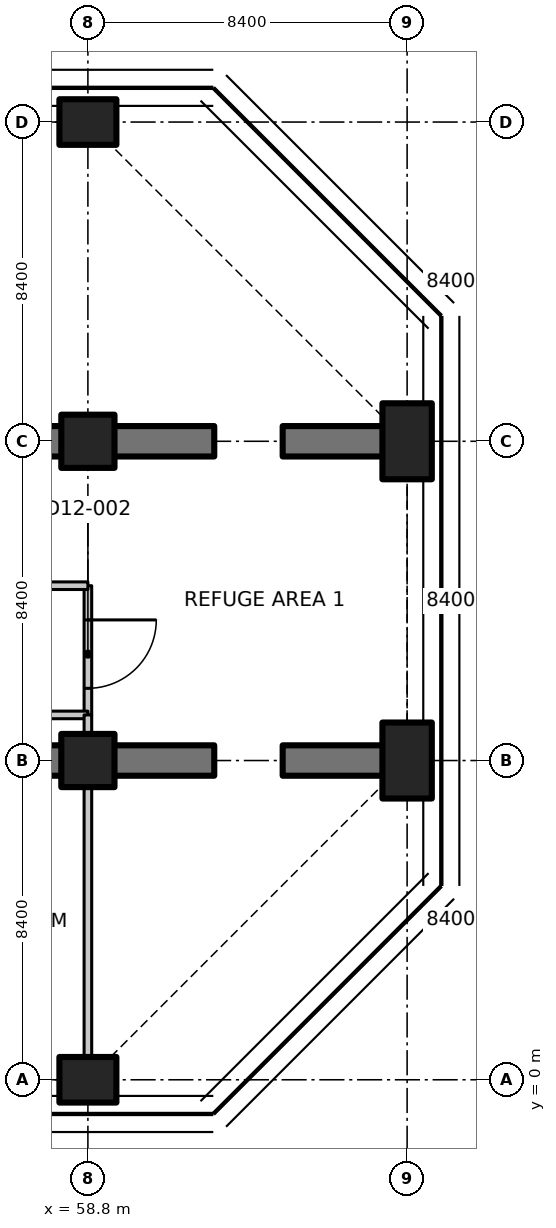
"""IFC4 building model, lengths in metres.
Left out: names, types, materials, properties, quantities, classifications, styles, units other than length and angle.
Written with IfcOpenShell. Run it as: python <this file> out.ifc"""

import sys

from ifc_helpers import new_model, si_unit, direction, frame, frame_2d, origin, origin_2d, place, context, subcontext, project, spatial, polyline, rectangle, outline, extrude, element, fill, save


model = new_model("IFC4")
c1 = context("Model", 3, precision=1e-05, world=origin(), true_north=direction((0.0, 1.0)))
c2 = subcontext(c1, "Body", "Model", "MODEL_VIEW")
j1 = project(units=[si_unit("LENGTHUNIT", "METRE"), si_unit("PLANEANGLEUNIT", "RADIAN")], contexts=[c1])
p1 = place(None, origin())
s1 = spatial("IfcSite", under=j1, at=p1, CompositionType="ELEMENT")
p2 = place(p1, origin())
s2 = spatial("IfcBuilding", under=s1, at=p2, CompositionType="ELEMENT")
p3 = place(p2, frame((0.0, 0.0, 86.9)))
s3 = spatial("IfcBuildingStorey", under=s2, at=p3, CompositionType="ELEMENT", Elevation=86.9)
p4 = place(p3, frame((58.8, 0.0, 0.0), z_axis=(0.0, 0.0, 1.0), x_axis=(0.0, 1.0, 0.0)))
e1 = element("IfcColumn", 1, at=p4, inside=s3, PredefinedType="COLUMN", context=c2, shape_type="SweptSolid", body=[
    extrude(rectangle(XDim=1.2, YDim=1.5, at=origin_2d()), origin(), (0.0, 0.0, 1.0), 4.55),
])
for number, where, z_axis, x_axis in (
    (2, (58.8, 8.4, 0.0), (0.0, 0.0, 1.0), (1.0, 0.0, 0.0)),
    (3, (58.8, 16.8, 0.0), (0.0, 0.0, 1.0), (1.0, 0.0, 0.0)),
):
    element("IfcColumn", number, at=place(p3, frame(where, z_axis=z_axis, x_axis=x_axis)), inside=s3, PredefinedType="COLUMN", context=c2, shape_type="SweptSolid", body=[
        extrude(rectangle(XDim=1.4, YDim=1.4, at=origin_2d()), origin(), (0.0, 0.0, 1.0), 4.55),
    ])
p5 = place(p3, frame((58.8, 25.2, 0.0), z_axis=(0.0, 0.0, 1.0), x_axis=(0.0, 1.0, 0.0)))
e4 = element("IfcColumn", 4, at=p5, inside=s3, PredefinedType="COLUMN", context=c2, shape_type="SweptSolid", body=[
    extrude(rectangle(XDim=1.2, YDim=1.5, at=origin_2d()), origin(), (0.0, 0.0, 1.0), 4.55),
])
for number, where, z_axis, x_axis in (
    (5, (67.2, 8.4, 0.0), (0.0, 0.0, 1.0), (1.0, 0.0, 0.0)),
    (6, (67.2, 16.8, 0.0), (0.0, 0.0, 1.0), (1.0, 0.0, 0.0)),
):
    element("IfcColumn", number, at=place(p3, frame(where, z_axis=z_axis, x_axis=x_axis)), inside=s3, PredefinedType="COLUMN", context=c2, shape_type="SweptSolid", body=[
        extrude(rectangle(XDim=1.3, YDim=2.0, at=origin_2d()), origin(), (0.0, 0.0, 1.0), 4.55),
    ])
p6 = place(p3, frame((55.5, 8.4, 0.0), z_axis=(0.0, 0.0, 1.0), x_axis=(1.0, 0.0, 0.0)))
e7 = element("IfcWall", 7, at=p6, inside=s3, PredefinedType="SHEAR", context=c2, shape_type="SweptSolid", body=[
    extrude(rectangle(XDim=2.63, YDim=0.8, at=frame_2d((1.315, 0.0))), origin(), (0.0, 0.0, 1.0), 4.55),
])
for number, where, z_axis, x_axis in (
    (8, (59.47, 8.4, 0.0), (0.0, 0.0, 1.0), (1.0, 0.0, 0.0)),
    (9, (63.925, 8.4, 0.0), (0.0, 0.0, 1.0), (1.0, 0.0, 0.0)),
):
    element("IfcWall", number, at=place(p3, frame(where, z_axis=z_axis, x_axis=x_axis)), inside=s3, PredefinedType="SHEAR", context=c2, shape_type="SweptSolid", body=[
        extrude(rectangle(XDim=2.655, YDim=0.8, at=frame_2d((1.328, 0.0))), origin(), (0.0, 0.0, 1.0), 4.55),
    ])
p7 = place(p3, frame((55.5, 16.8, 0.0), z_axis=(0.0, 0.0, 1.0), x_axis=(1.0, 0.0, 0.0)))
e10 = element("IfcWall", 10, at=p7, inside=s3, PredefinedType="SHEAR", context=c2, shape_type="SweptSolid", body=[
    extrude(rectangle(XDim=2.63, YDim=0.8, at=frame_2d((1.315, 0.0))), origin(), (0.0, 0.0, 1.0), 4.55),
])
for number, where, z_axis, x_axis in (
    (11, (59.47, 16.8, 0.0), (0.0, 0.0, 1.0), (1.0, 0.0, 0.0)),
    (12, (63.925, 16.8, 0.0), (0.0, 0.0, 1.0), (1.0, 0.0, 0.0)),
):
    element("IfcWall", number, at=place(p3, frame(where, z_axis=z_axis, x_axis=x_axis)), inside=s3, PredefinedType="SHEAR", context=c2, shape_type="SweptSolid", body=[
        extrude(rectangle(XDim=2.655, YDim=0.8, at=frame_2d((1.328, 0.0))), origin(), (0.0, 0.0, 1.0), 4.55),
    ])
p8 = place(p3, frame((58.8, 13.0, 0.0), z_axis=(0.0, 0.0, 1.0), x_axis=(0.0, -1.0, 0.0)))
e13 = element("IfcWall", 13, at=p8, inside=s3, PredefinedType="PARTITIONING", context=c2, shape_type="SweptSolid", body=[
    extrude(rectangle(XDim=3.4, YDim=0.2, at=frame_2d((1.7, 0.0))), origin(), (0.0, 0.0, 1.0), 4.53),
])
p9 = place(p8, frame((0.9, 0.0, 0.0)))
e14 = element("IfcOpeningElement", 14, at=p9, cuts=e13, PredefinedType="OPENING", context=c2, shape_type="SweptSolid", body=[
    extrude(rectangle(XDim=1.8, YDim=2.1, at=frame_2d((0.9, 1.05))), frame((0.0, 0.11, 0.0), z_axis=(0.0, -1.0, 0.0), x_axis=(1.0, 0.0, 0.0)), (0.0, 0.0, 1.0), 0.22),
])
p10 = place(p3, frame((58.8, 9.6, 0.0), z_axis=(0.0, 0.0, 1.0), x_axis=(-1.0, 0.0, 0.0)))
e15 = element("IfcWall", 15, at=p10, inside=s3, PredefinedType="PARTITIONING", context=c2, shape_type="SweptSolid", body=[
    extrude(rectangle(XDim=4.2, YDim=0.2, at=frame_2d((2.1, 0.0))), origin(), (0.0, 0.0, 1.0), 4.53),
])
p11 = place(p10, frame((1.5, 0.0, 0.0)))
e16 = element("IfcOpeningElement", 16, at=p11, cuts=e15, PredefinedType="OPENING", context=c2, shape_type="SweptSolid", body=[
    extrude(rectangle(XDim=1.0, YDim=2.1, at=frame_2d((0.5, 1.05))), frame((0.0, 0.11, 0.0), z_axis=(0.0, -1.0, 0.0), x_axis=(1.0, 0.0, 0.0)), (0.0, 0.0, 1.0), 0.22),
])
p12 = place(p3, frame((54.6, 13.0, 0.0), z_axis=(0.0, 0.0, 1.0), x_axis=(1.0, 0.0, 0.0)))
e17 = element("IfcWall", 17, at=p12, inside=s3, PredefinedType="PARTITIONING", context=c2, shape_type="SweptSolid", body=[
    extrude(rectangle(XDim=4.2, YDim=0.2, at=frame_2d((2.1, 0.0))), origin(), (0.0, 0.0, 1.0), 4.53),
])
p13 = place(p12, frame((1.5, 0.0, 0.0)))
e18 = element("IfcOpeningElement", 18, at=p13, cuts=e17, PredefinedType="OPENING", context=c2, shape_type="SweptSolid", body=[
    extrude(rectangle(XDim=1.0, YDim=2.1, at=frame_2d((0.5, 1.05))), frame((0.0, 0.11, 0.0), z_axis=(0.0, -1.0, 0.0), x_axis=(1.0, 0.0, 0.0)), (0.0, 0.0, 1.0), 0.22),
])
p14 = place(p3, frame((58.8, 0.62, 0.0), z_axis=(0.0, 0.0, 1.0), x_axis=(0.0, 1.0, 0.0)))
e19 = element("IfcWall", 19, at=p14, inside=s3, PredefinedType="PARTITIONING", context=c2, shape_type="SweptSolid", body=[
    extrude(outline(polyline([(0.0, 0.0), (7.06, 0.0), (7.06, 4.53), (0.096, 4.53), (0.094, 4.18), (0.0, 4.18), (0.0, 0.0)])), frame((0.0, 0.1, 0.0), z_axis=(0.0, -1.0, 0.0), x_axis=(1.0, 0.0, 0.0)), (0.0, 0.0, 1.0), 0.2),
])
p15 = place(p3, frame((58.8, 9.12, 0.0), z_axis=(0.0, 0.0, 1.0), x_axis=(0.0, 1.0, 0.0)))
e20 = element("IfcWall", 20, at=p15, inside=s3, PredefinedType="PARTITIONING", context=c2, shape_type="SweptSolid", body=[
    extrude(rectangle(XDim=0.48, YDim=0.2, at=frame_2d((0.24, 0.0))), origin(), (0.0, 0.0, 1.0), 4.53),
])
p16 = place(p9, origin())
e21 = element("IfcDoor", 21, at=p16, inside=s3, OperationType="DOUBLE_DOOR_SINGLE_SWING", PredefinedType="DOOR", context=c2, shape_type="SweptSolid", body=[
    extrude(rectangle(XDim=1.8, YDim=2.1, at=frame_2d((0.9, 1.05))), frame((0.0, 0.025, 0.0), z_axis=(0.0, -1.0, 0.0), x_axis=(1.0, 0.0, 0.0)), (0.0, 0.0, 1.0), 0.05),
])
fill(e14, e21)
save(model, sys.argv[1])
